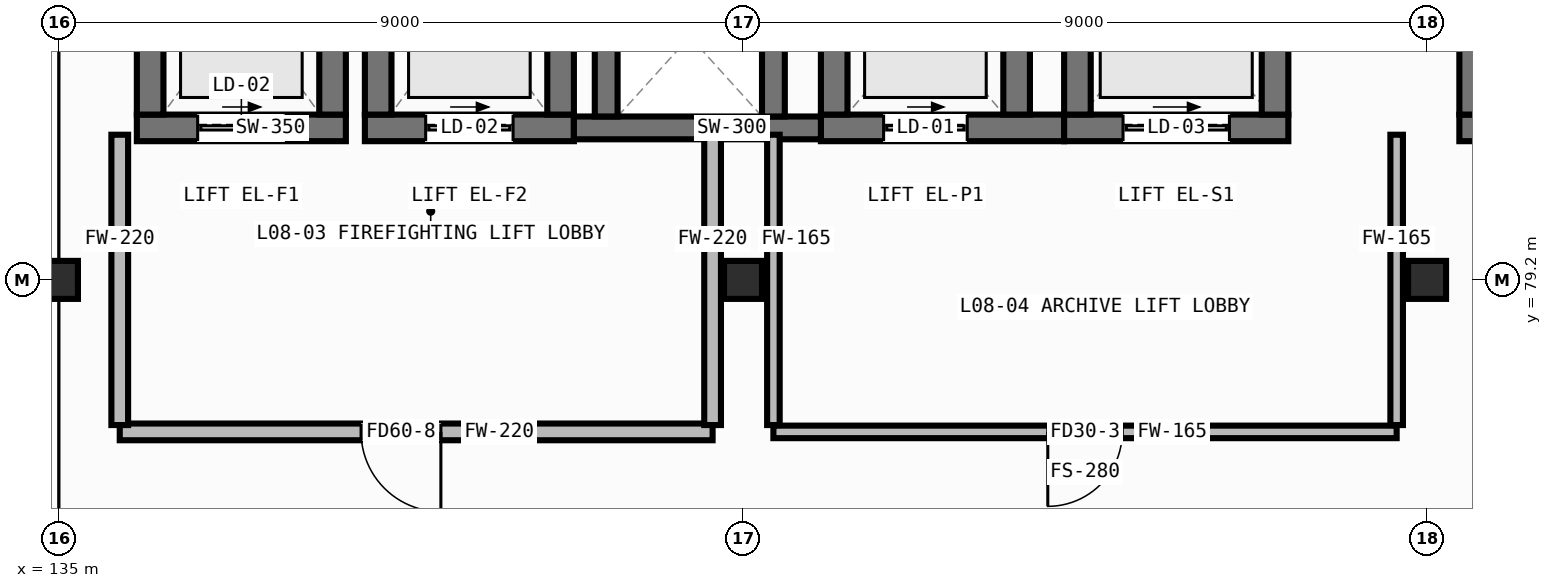
"""IFC4 building model, lengths in metres.
Left out: names, types, materials, properties, quantities, classifications, styles, units other than length and angle.
Written with IfcOpenShell. Run it as: python <this file> out.ifc"""

import sys

from ifc_helpers import new_model, si_unit, direction, frame, frame_2d, origin, origin_2d, place, context, subcontext, project, spatial, rectangle, hollow_rectangle, extrude, element, fill, save


model = new_model("IFC4")
c1 = context("Model", 3, precision=1e-05, world=origin(), true_north=direction((0.0, 1.0)))
c2 = subcontext(c1, "Body", "Model", "MODEL_VIEW")
j1 = project(units=[si_unit("LENGTHUNIT", "METRE"), si_unit("PLANEANGLEUNIT", "RADIAN")], contexts=[c1])
p1 = place(None, origin())
s1 = spatial("IfcSite", under=j1, at=p1, CompositionType="ELEMENT")
p2 = place(p1, origin())
s2 = spatial("IfcBuilding", under=s1, at=p2, CompositionType="ELEMENT")
p3 = place(p2, frame((0.0, 0.0, 27.8)))
s3 = spatial("IfcBuildingStorey", under=s2, at=p3, CompositionType="ELEMENT", Elevation=27.8)
for number, where, z_axis, x_axis in (
    (1, (135.0, 79.2, 0.0), (0.0, 0.0, 1.0), (1.0, 0.0, 0.0)),
    (2, (144.0, 79.2, 0.0), (0.0, 0.0, 1.0), (1.0, 0.0, 0.0)),
    (3, (153.0, 79.2, 0.0), (0.0, 0.0, 1.0), (1.0, 0.0, 0.0)),
):
    element("IfcColumn", number, at=place(p3, frame(where, z_axis=z_axis, x_axis=x_axis)), inside=s3, PredefinedType="COLUMN", context=c2, shape_type="SweptSolid", body=[
        extrude(hollow_rectangle(XDim=0.5, YDim=0.5, WallThickness=0.022, at=origin_2d()), origin(), (0.0, 0.0, 1.0), 3.6),
    ])
p4 = place(p3, frame((153.425, 81.2, 0.0), z_axis=(0.0, 0.0, 1.0), x_axis=(1.0, 0.0, 0.0)))
e4 = element("IfcWall", 4, at=p4, inside=s3, PredefinedType="SHEAR", context=c2, shape_type="SweptSolid", body=[
    extrude(rectangle(XDim=8.15, YDim=0.35, at=frame_2d((4.075, 0.0))), origin(), (0.0, 0.0, 1.0), 3.315),
])
p5 = place(p4, frame((0.525, 0.0, 0.0)))
e5 = element("IfcOpeningElement", 5, at=p5, cuts=e4, PredefinedType="OPENING", context=c2, shape_type="SweptSolid", body=[
    extrude(rectangle(XDim=1.15, YDim=2.1, at=frame_2d((0.575, 1.05))), frame((0.0, 0.187, 0.0), z_axis=(0.0, -1.0, 0.0), x_axis=(1.0, 0.0, 0.0)), (0.0, 0.0, 1.0), 0.374),
])
p6 = place(p3, frame((153.6, 81.375, 0.0), z_axis=(0.0, 0.0, 1.0), x_axis=(0.0, 1.0, 0.0)))
e6 = element("IfcWall", 6, at=p6, inside=s3, PredefinedType="SHEAR", context=c2, shape_type="SweptSolid", body=[
    extrude(rectangle(XDim=3.55, YDim=0.35, at=frame_2d((1.775, 0.0))), origin(), (0.0, 0.0, 1.0), 3.315),
])
p7 = place(p3, frame((136.025, 81.2, 0.0), z_axis=(0.0, 0.0, 1.0), x_axis=(1.0, 0.0, 0.0)))
e7 = element("IfcWall", 7, at=p7, inside=s3, PredefinedType="SHEAR", context=c2, shape_type="SweptSolid", body=[
    extrude(rectangle(XDim=2.75, YDim=0.35, at=frame_2d((1.375, 0.0))), origin(), (0.0, 0.0, 1.0), 3.315),
])
p8 = place(p7, frame((0.8, 0.0, 0.0)))
e8 = element("IfcOpeningElement", 8, at=p8, cuts=e7, PredefinedType="OPENING", context=c2, shape_type="SweptSolid", body=[
    extrude(rectangle(XDim=1.15, YDim=2.12, at=frame_2d((0.575, 1.06))), frame((0.0, 0.187, 0.0), z_axis=(0.0, -1.0, 0.0), x_axis=(1.0, 0.0, 0.0)), (0.0, 0.0, 1.0), 0.374),
])
for number, where, z_axis, x_axis in (
    (9, (136.2, 81.375, 0.0), (0.0, 0.0, 1.0), (0.0, 1.0, 0.0)),
    (10, (138.6, 81.375, 0.0), (0.0, 0.0, 1.0), (0.0, 1.0, 0.0)),
):
    element("IfcWall", number, at=place(p3, frame(where, z_axis=z_axis, x_axis=x_axis)), inside=s3, PredefinedType="SHEAR", context=c2, shape_type="SweptSolid", body=[
        extrude(rectangle(XDim=2.85, YDim=0.35, at=frame_2d((1.425, 0.0))), origin(), (0.0, 0.0, 1.0), 3.315),
    ])
p9 = place(p3, frame((139.025, 81.2, 0.0), z_axis=(0.0, 0.0, 1.0), x_axis=(1.0, 0.0, 0.0)))
e11 = element("IfcWall", 11, at=p9, inside=s3, PredefinedType="SHEAR", context=c2, shape_type="SweptSolid", body=[
    extrude(rectangle(XDim=2.75, YDim=0.35, at=frame_2d((1.375, 0.0))), origin(), (0.0, 0.0, 1.0), 3.315),
])
p10 = place(p9, frame((0.8, 0.0, 0.0)))
e12 = element("IfcOpeningElement", 12, at=p10, cuts=e11, PredefinedType="OPENING", context=c2, shape_type="SweptSolid", body=[
    extrude(rectangle(XDim=1.15, YDim=2.12, at=frame_2d((0.575, 1.06))), frame((0.0, 0.187, 0.0), z_axis=(0.0, -1.0, 0.0), x_axis=(1.0, 0.0, 0.0)), (0.0, 0.0, 1.0), 0.374),
])
for number, where, z_axis, x_axis in (
    (13, (139.2, 81.375, 0.0), (0.0, 0.0, 1.0), (0.0, 1.0, 0.0)),
    (14, (141.6, 81.375, 0.0), (0.0, 0.0, 1.0), (0.0, 1.0, 0.0)),
):
    element("IfcWall", number, at=place(p3, frame(where, z_axis=z_axis, x_axis=x_axis)), inside=s3, PredefinedType="SHEAR", context=c2, shape_type="SweptSolid", body=[
        extrude(rectangle(XDim=2.85, YDim=0.35, at=frame_2d((1.425, 0.0))), origin(), (0.0, 0.0, 1.0), 3.315),
    ])
p11 = place(p3, frame((145.025, 81.2, 0.0), z_axis=(0.0, 0.0, 1.0), x_axis=(1.0, 0.0, 0.0)))
e15 = element("IfcWall", 15, at=p11, inside=s3, PredefinedType="SHEAR", context=c2, shape_type="SweptSolid", body=[
    extrude(rectangle(XDim=3.2, YDim=0.35, at=frame_2d((1.6, 0.0))), origin(), (0.0, 0.0, 1.0), 3.315),
])
p12 = place(p11, frame((0.825, 0.0, 0.0)))
e16 = element("IfcOpeningElement", 16, at=p12, cuts=e15, PredefinedType="OPENING", context=c2, shape_type="SweptSolid", body=[
    extrude(rectangle(XDim=1.1, YDim=2.1, at=frame_2d((0.55, 1.05))), frame((0.0, 0.187, 0.0), z_axis=(0.0, -1.0, 0.0), x_axis=(1.0, 0.0, 0.0)), (0.0, 0.0, 1.0), 0.374),
])
for number, where, z_axis, x_axis in (
    (17, (145.2, 81.375, 0.0), (0.0, 0.0, 1.0), (0.0, 1.0, 0.0)),
    (18, (147.6, 81.375, 0.0), (0.0, 0.0, 1.0), (0.0, 1.0, 0.0)),
):
    element("IfcWall", number, at=place(p3, frame(where, z_axis=z_axis, x_axis=x_axis)), inside=s3, PredefinedType="SHEAR", context=c2, shape_type="SweptSolid", body=[
        extrude(rectangle(XDim=2.45, YDim=0.35, at=frame_2d((1.225, 0.0))), origin(), (0.0, 0.0, 1.0), 3.315),
    ])
p13 = place(p3, frame((148.225, 81.2, 0.0), z_axis=(0.0, 0.0, 1.0), x_axis=(1.0, 0.0, 0.0)))
e19 = element("IfcWall", 19, at=p13, inside=s3, PredefinedType="SHEAR", context=c2, shape_type="SweptSolid", body=[
    extrude(rectangle(XDim=2.95, YDim=0.35, at=frame_2d((1.475, 0.0))), origin(), (0.0, 0.0, 1.0), 3.315),
])
p14 = place(p13, frame((0.775, 0.0, 0.0)))
e20 = element("IfcOpeningElement", 20, at=p14, cuts=e19, PredefinedType="OPENING", context=c2, shape_type="SweptSolid", body=[
    extrude(rectangle(XDim=1.4, YDim=2.15, at=frame_2d((0.7, 1.075))), frame((0.0, 0.187, 0.0), z_axis=(0.0, -1.0, 0.0), x_axis=(1.0, 0.0, 0.0)), (0.0, 0.0, 1.0), 0.374),
])
for number, where, z_axis, x_axis in (
    (21, (148.4, 81.375, 0.0), (0.0, 0.0, 1.0), (0.0, 1.0, 0.0)),
    (22, (151.0, 81.375, 0.0), (0.0, 0.0, 1.0), (0.0, 1.0, 0.0)),
):
    element("IfcWall", number, at=place(p3, frame(where, z_axis=z_axis, x_axis=x_axis)), inside=s3, PredefinedType="SHEAR", context=c2, shape_type="SweptSolid", body=[
        extrude(rectangle(XDim=3.05, YDim=0.35, at=frame_2d((1.525, 0.0))), origin(), (0.0, 0.0, 1.0), 3.315),
    ])
p15 = place(p3, frame((141.775, 81.2, 0.0), z_axis=(0.0, 0.0, 1.0), x_axis=(1.0, 0.0, 0.0)))
e23 = element("IfcWall", 23, at=p15, inside=s3, PredefinedType="SHEAR", context=c2, shape_type="SweptSolid", body=[
    extrude(rectangle(XDim=3.25, YDim=0.3, at=frame_2d((1.625, 0.0))), origin(), (0.0, 0.0, 1.0), 3.315),
])
for number, where, z_axis, x_axis in (
    (24, (142.2, 81.35, 0.0), (0.0, 0.0, 1.0), (0.0, 1.0, 0.0)),
    (25, (144.4, 81.35, 0.0), (0.0, 0.0, 1.0), (0.0, 1.0, 0.0)),
):
    element("IfcWall", number, at=place(p3, frame(where, z_axis=z_axis, x_axis=x_axis)), inside=s3, PredefinedType="SHEAR", context=c2, shape_type="SweptSolid", body=[
        extrude(rectangle(XDim=2.1, YDim=0.3, at=frame_2d((1.05, 0.0))), origin(), (0.0, 0.0, 1.0), 3.315),
    ])
p16 = place(p3, frame((135.8, 77.2, 0.0), z_axis=(0.0, 0.0, 1.0), x_axis=(1.0, 0.0, 0.0)))
e26 = element("IfcWall", 26, at=p16, inside=s3, PredefinedType="PARTITIONING", context=c2, shape_type="SweptSolid", body=[
    extrude(rectangle(XDim=7.8, YDim=0.22, at=frame_2d((3.9, 0.0))), origin(), (0.0, 0.0, 1.0), 3.315),
])
p17 = place(p16, frame((3.175, 0.0, 0.0)))
e27 = element("IfcOpeningElement", 27, at=p17, cuts=e26, PredefinedType="OPENING", context=c2, shape_type="SweptSolid", body=[
    extrude(rectangle(XDim=1.05, YDim=2.02, at=frame_2d((0.525, 1.01))), frame((0.0, 0.122, 0.0), z_axis=(0.0, -1.0, 0.0), x_axis=(1.0, 0.0, 0.0)), (0.0, 0.0, 1.0), 0.244),
])
for number, where, z_axis, x_axis in (
    (28, (135.8, 77.29, 0.0), (0.0, 0.0, 1.0), (0.0, 1.0, 0.0)),
    (29, (143.6, 77.29, 0.0), (0.0, 0.0, 1.0), (0.0, 1.0, 0.0)),
):
    element("IfcWall", number, at=place(p3, frame(where, z_axis=z_axis, x_axis=x_axis)), inside=s3, PredefinedType="PARTITIONING", context=c2, shape_type="SweptSolid", body=[
        extrude(rectangle(XDim=3.82, YDim=0.22, at=frame_2d((1.91, 0.0))), origin(), (0.0, 0.0, 1.0), 3.315),
    ])
p18 = place(p3, frame((144.4, 77.2, 0.0), z_axis=(0.0, 0.0, 1.0), x_axis=(1.0, 0.0, 0.0)))
e30 = element("IfcWall", 30, at=p18, inside=s3, PredefinedType="PARTITIONING", context=c2, shape_type="SweptSolid", body=[
    extrude(rectangle(XDim=8.2, YDim=0.165, at=frame_2d((4.1, 0.0))), origin(), (0.0, 0.0, 1.0), 3.315),
])
p19 = place(p18, frame((3.61, 0.0, 0.0)))
e31 = element("IfcOpeningElement", 31, at=p19, cuts=e30, PredefinedType="OPENING", context=c2, shape_type="SweptSolid", body=[
    extrude(rectangle(XDim=0.98, YDim=2.02, at=frame_2d((0.49, 1.01))), frame((0.0, 0.094, 0.0), z_axis=(0.0, -1.0, 0.0), x_axis=(1.0, 0.0, 0.0)), (0.0, 0.0, 1.0), 0.189),
])
for number, where, z_axis, x_axis in (
    (32, (144.4, 77.29, 0.0), (0.0, 0.0, 1.0), (0.0, 1.0, 0.0)),
    (33, (152.6, 77.29, 0.0), (0.0, 0.0, 1.0), (0.0, 1.0, 0.0)),
):
    element("IfcWall", number, at=place(p3, frame(where, z_axis=z_axis, x_axis=x_axis)), inside=s3, PredefinedType="PARTITIONING", context=c2, shape_type="SweptSolid", body=[
        extrude(rectangle(XDim=3.82, YDim=0.165, at=frame_2d((1.91, 0.0))), origin(), (0.0, 0.0, 1.0), 3.315),
    ])
p20 = place(p8, origin())
e34 = element("IfcDoor", 34, at=p20, inside=s3, OperationType="SLIDING_TO_LEFT", PredefinedType="DOOR", context=c2, shape_type="SweptSolid", body=[
    extrude(rectangle(XDim=1.15, YDim=2.12, at=frame_2d((0.575, 1.06))), frame((0.0, 0.025, 0.0), z_axis=(0.0, -1.0, 0.0), x_axis=(1.0, 0.0, 0.0)), (0.0, 0.0, 1.0), 0.05),
])
fill(e8, e34)
p21 = place(p10, origin())
e35 = element("IfcDoor", 35, at=p21, inside=s3, OperationType="SLIDING_TO_LEFT", PredefinedType="DOOR", context=c2, shape_type="SweptSolid", body=[
    extrude(rectangle(XDim=1.15, YDim=2.12, at=frame_2d((0.575, 1.06))), frame((0.0, 0.025, 0.0), z_axis=(0.0, -1.0, 0.0), x_axis=(1.0, 0.0, 0.0)), (0.0, 0.0, 1.0), 0.05),
])
fill(e12, e35)
p22 = place(p12, origin())
e36 = element("IfcDoor", 36, at=p22, inside=s3, OperationType="SLIDING_TO_LEFT", PredefinedType="DOOR", context=c2, shape_type="SweptSolid", body=[
    extrude(rectangle(XDim=1.1, YDim=2.1, at=frame_2d((0.55, 1.05))), frame((0.0, 0.025, 0.0), z_axis=(0.0, -1.0, 0.0), x_axis=(1.0, 0.0, 0.0)), (0.0, 0.0, 1.0), 0.05),
])
fill(e16, e36)
p23 = place(p14, origin())
e37 = element("IfcDoor", 37, at=p23, inside=s3, OperationType="SLIDING_TO_LEFT", PredefinedType="DOOR", context=c2, shape_type="SweptSolid", body=[
    extrude(rectangle(XDim=1.4, YDim=2.15, at=frame_2d((0.7, 1.075))), frame((0.0, 0.025, 0.0), z_axis=(0.0, -1.0, 0.0), x_axis=(1.0, 0.0, 0.0)), (0.0, 0.0, 1.0), 0.05),
])
fill(e20, e37)
p24 = place(p17, frame((1.05, 0.0, 0.0), z_axis=(0.0, 0.0, 1.0), x_axis=(-1.0, 0.0, 0.0)))
e38 = element("IfcDoor", 38, at=p24, inside=s3, OperationType="SINGLE_SWING_LEFT", PredefinedType="DOOR", context=c2, shape_type="SweptSolid", body=[
    extrude(rectangle(XDim=1.05, YDim=2.02, at=frame_2d((0.525, 1.01))), frame((0.0, 0.025, 0.0), z_axis=(0.0, -1.0, 0.0), x_axis=(1.0, 0.0, 0.0)), (0.0, 0.0, 1.0), 0.05),
])
fill(e27, e38)
p25 = place(p19, frame((0.98, 0.0, 0.0), z_axis=(0.0, 0.0, 1.0), x_axis=(-1.0, 0.0, 0.0)))
e39 = element("IfcDoor", 39, at=p25, inside=s3, OperationType="SINGLE_SWING_RIGHT", PredefinedType="DOOR", context=c2, shape_type="SweptSolid", body=[
    extrude(rectangle(XDim=0.98, YDim=2.02, at=frame_2d((0.49, 1.01))), frame((0.0, 0.025, 0.0), z_axis=(0.0, -1.0, 0.0), x_axis=(1.0, 0.0, 0.0)), (0.0, 0.0, 1.0), 0.05),
])
fill(e31, e39)
save(model, sys.argv[1])
